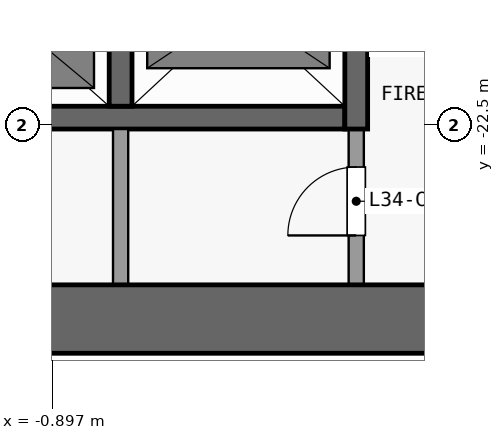
"""IFC4 building model, lengths in metres.
Left out: names, types, materials, properties, quantities, classifications, styles, units other than length and angle.
Written with IfcOpenShell. Run it as: python <this file> out.ifc"""

import sys

from ifc_helpers import new_model, si_unit, direction, frame, frame_2d, origin, place, context, subcontext, project, spatial, rectangle, extrude, element, fill, save


model = new_model("IFC4")
c1 = context("Model", 3, precision=1e-05, world=origin(), true_north=direction((0.0, 1.0)))
c2 = subcontext(c1, "Body", "Model", "MODEL_VIEW")
j1 = project(units=[si_unit("LENGTHUNIT", "METRE"), si_unit("PLANEANGLEUNIT", "RADIAN")], contexts=[c1])
p1 = place(None, origin())
s1 = spatial("IfcSite", under=j1, at=p1, CompositionType="ELEMENT")
p2 = place(p1, origin())
s2 = spatial("IfcBuilding", under=s1, at=p2, CompositionType="ELEMENT")
p3 = place(p2, frame((0.0, 0.0, 138.9)))
s3 = spatial("IfcBuildingStorey", under=s2, at=p3, CompositionType="ELEMENT", Elevation=138.9)
p4 = place(p3, frame((-13.4, -25.05, 0.0), z_axis=(0.0, 0.0, 1.0), x_axis=(1.0, 0.0, 0.0)))
e1 = element("IfcWall", 1, at=p4, inside=s3, PredefinedType="SHEAR", context=c2, shape_type="SweptSolid", body=[
    extrude(rectangle(XDim=26.8, YDim=0.9, at=frame_2d((13.4, 0.0))), origin(), (0.0, 0.0, 1.0), 4.55),
])
p5 = place(p3, frame((-3.25, -22.4, 0.0), z_axis=(0.0, 0.0, 1.0), x_axis=(1.0, 0.0, 0.0)))
e2 = element("IfcWall", 2, at=p5, inside=s3, PredefinedType="SHEAR", context=c2, shape_type="SweptSolid", body=[
    extrude(rectangle(XDim=6.2, YDim=0.3, at=frame_2d((3.1, 0.0))), origin(), (0.0, 0.0, 1.0), 4.55),
])
p6 = place(p3, frame((0.0, -24.6, 0.0), z_axis=(0.0, 0.0, 1.0), x_axis=(0.0, 1.0, 0.0)))
e3 = element("IfcWall", 3, at=p6, inside=s3, PredefinedType="PARTITIONING", context=c2, shape_type="SweptSolid", body=[
    extrude(rectangle(XDim=2.05, YDim=0.2, at=frame_2d((1.025, 0.0))), origin(), (0.0, 0.0, 1.0), 4.55),
])
p7 = place(p3, frame((0.0, -22.25, 0.0), z_axis=(0.0, 0.0, 1.0), x_axis=(0.0, 1.0, 0.0)))
e4 = element("IfcWall", 4, at=p7, inside=s3, PredefinedType="SHEAR", context=c2, shape_type="SweptSolid", body=[
    extrude(rectangle(XDim=13.75, YDim=0.3, at=frame_2d((6.875, 0.0))), origin(), (0.0, 0.0, 1.0), 4.55),
])
p8 = place(p3, frame((3.1, -24.6, 0.0), z_axis=(0.0, 0.0, 1.0), x_axis=(0.0, 1.0, 0.0)))
e5 = element("IfcWall", 5, at=p8, inside=s3, PredefinedType="PARTITIONING", context=c2, shape_type="SweptSolid", body=[
    extrude(rectangle(XDim=2.05, YDim=0.2, at=frame_2d((1.025, 0.0))), origin(), (0.0, 0.0, 1.0), 4.55),
])
p9 = place(p8, frame((0.65, 0.0, 0.0)))
e6 = element("IfcOpeningElement", 6, at=p9, cuts=e5, PredefinedType="OPENING", context=c2, shape_type="SweptSolid", body=[
    extrude(rectangle(XDim=0.9, YDim=2.1, at=frame_2d((0.45, 1.05))), frame((0.0, 0.11, 0.0), z_axis=(0.0, -1.0, 0.0), x_axis=(1.0, 0.0, 0.0)), (0.0, 0.0, 1.0), 0.22),
])
p10 = place(p3, frame((3.1, -22.55, 0.0), z_axis=(0.0, 0.0, 1.0), x_axis=(0.0, 1.0, 0.0)))
e7 = element("IfcWall", 7, at=p10, inside=s3, PredefinedType="SHEAR", context=c2, shape_type="SweptSolid", body=[
    extrude(rectangle(XDim=14.05, YDim=0.3, at=frame_2d((7.025, 0.0))), origin(), (0.0, 0.0, 1.0), 4.55),
])
p11 = place(p10, frame((1.05, 0.0, 0.0)))
e8 = element("IfcOpeningElement", 8, at=p11, cuts=e7, PredefinedType="OPENING", context=c2, shape_type="SweptSolid", body=[
    extrude(rectangle(XDim=1.1, YDim=2.1, at=frame_2d((0.55, 1.05))), frame((0.0, 0.16, 0.0), z_axis=(0.0, -1.0, 0.0), x_axis=(1.0, 0.0, 0.0)), (0.0, 0.0, 1.0), 0.32),
])
p12 = place(p10, frame((3.875, 0.0, 0.0)))
e9 = element("IfcOpeningElement", 9, at=p12, cuts=e7, PredefinedType="OPENING", context=c2, shape_type="SweptSolid", body=[
    extrude(rectangle(XDim=1.1, YDim=2.1, at=frame_2d((0.55, 1.05))), frame((0.0, 0.16, 0.0), z_axis=(0.0, -1.0, 0.0), x_axis=(1.0, 0.0, 0.0)), (0.0, 0.0, 1.0), 0.32),
])
p13 = place(p10, frame((6.625, 0.0, 0.0)))
e10 = element("IfcOpeningElement", 10, at=p13, cuts=e7, PredefinedType="OPENING", context=c2, shape_type="SweptSolid", body=[
    extrude(rectangle(XDim=1.1, YDim=2.1, at=frame_2d((0.55, 1.05))), frame((0.0, 0.16, 0.0), z_axis=(0.0, -1.0, 0.0), x_axis=(1.0, 0.0, 0.0)), (0.0, 0.0, 1.0), 0.32),
])
p14 = place(p10, frame((9.375, 0.0, 0.0)))
e11 = element("IfcOpeningElement", 11, at=p14, cuts=e7, PredefinedType="OPENING", context=c2, shape_type="SweptSolid", body=[
    extrude(rectangle(XDim=1.1, YDim=2.1, at=frame_2d((0.55, 1.05))), frame((0.0, 0.16, 0.0), z_axis=(0.0, -1.0, 0.0), x_axis=(1.0, 0.0, 0.0)), (0.0, 0.0, 1.0), 0.32),
])
p15 = place(p10, frame((12.125, 0.0, 0.0)))
e12 = element("IfcOpeningElement", 12, at=p15, cuts=e7, PredefinedType="OPENING", context=c2, shape_type="SweptSolid", body=[
    extrude(rectangle(XDim=1.1, YDim=2.1, at=frame_2d((0.55, 1.05))), frame((0.0, 0.16, 0.0), z_axis=(0.0, -1.0, 0.0), x_axis=(1.0, 0.0, 0.0)), (0.0, 0.0, 1.0), 0.32),
])
p16 = place(p9, origin())
e13 = element("IfcDoor", 13, at=p16, inside=s3, OperationType="SINGLE_SWING_LEFT", PredefinedType="DOOR", context=c2, shape_type="SweptSolid", body=[
    extrude(rectangle(XDim=0.9, YDim=2.1, at=frame_2d((0.45, 1.05))), frame((0.0, 0.025, 0.0), z_axis=(0.0, -1.0, 0.0), x_axis=(1.0, 0.0, 0.0)), (0.0, 0.0, 1.0), 0.05),
])
fill(e6, e13)
save(model, sys.argv[1])
